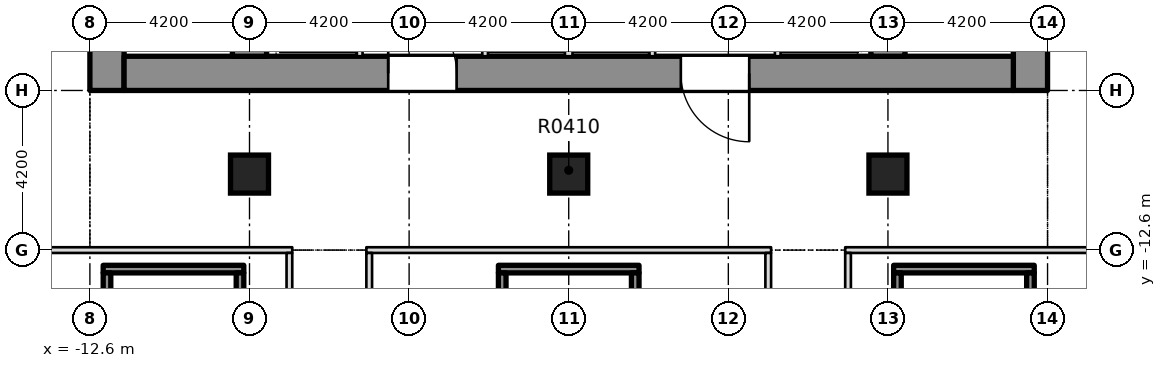
"""IFC4 building model, lengths in metres.
Left out: names, types, materials, properties, quantities, classifications, styles, units other than length and angle.
Written with IfcOpenShell. Run it as: python <this file> out.ifc"""

import sys

from ifc_helpers import new_model, si_unit, direction, frame, frame_2d, origin, origin_2d, place, context, subcontext, project, spatial, rectangle, extrude, element, fill, save


model = new_model("IFC4")
c1 = context("Model", 3, precision=1e-05, world=origin(), true_north=direction((0.0, 1.0)))
c2 = subcontext(c1, "Body", "Model", "MODEL_VIEW")
j1 = project(units=[si_unit("LENGTHUNIT", "METRE"), si_unit("PLANEANGLEUNIT", "RADIAN")], contexts=[c1])
p1 = place(None, origin())
s1 = spatial("IfcSite", under=j1, at=p1, CompositionType="ELEMENT")
p2 = place(p1, origin())
s2 = spatial("IfcBuilding", under=s1, at=p2, CompositionType="ELEMENT")
p3 = place(p2, frame((0.0, 0.0, 25.0)))
s3 = spatial("IfcBuildingStorey", under=s2, at=p3, CompositionType="ELEMENT", Elevation=25.0)
p4 = place(p3, frame((12.15, -8.4, -0.4), z_axis=(0.0, 0.0, 1.0), x_axis=(0.0, 1.0, 0.0)))
e1 = element("IfcWall", 1, at=p4, inside=s3, PredefinedType="SHEAR", context=c2, shape_type="SweptSolid", body=[
    extrude(rectangle(XDim=30.15, YDim=0.9, at=frame_2d((15.075, 0.0))), origin(), (0.0, 0.0, 1.0), 5.0),
])
p5 = place(p4, frame((2.875, 0.0, 0.4)))
e2 = element("IfcOpeningElement", 2, at=p5, cuts=e1, PredefinedType="OPENING", context=c2, shape_type="SweptSolid", body=[
    extrude(rectangle(XDim=0.95, YDim=2.1, at=frame_2d((0.475, 1.05))), frame((0.0, 0.46, 0.0), z_axis=(0.0, -1.0, 0.0), x_axis=(1.0, 0.0, 0.0)), (0.0, 0.0, 1.0), 0.92),
])
p6 = place(p4, frame((6.575, 0.0, 0.4)))
e3 = element("IfcOpeningElement", 3, at=p6, cuts=e1, PredefinedType="OPENING", context=c2, shape_type="SweptSolid", body=[
    extrude(rectangle(XDim=0.95, YDim=2.1, at=frame_2d((0.475, 1.05))), frame((0.0, 0.46, 0.0), z_axis=(0.0, -1.0, 0.0), x_axis=(1.0, 0.0, 0.0)), (0.0, 0.0, 1.0), 0.92),
])
p7 = place(p4, frame((9.425, 0.0, 0.4)))
e4 = element("IfcOpeningElement", 4, at=p7, cuts=e1, PredefinedType="OPENING", context=c2, shape_type="SweptSolid", body=[
    extrude(rectangle(XDim=0.95, YDim=2.1, at=frame_2d((0.475, 1.05))), frame((0.0, 0.46, 0.0), z_axis=(0.0, -1.0, 0.0), x_axis=(1.0, 0.0, 0.0)), (0.0, 0.0, 1.0), 0.92),
])
p8 = place(p4, frame((13.225, 0.0, 0.4)))
e5 = element("IfcOpeningElement", 5, at=p8, cuts=e1, PredefinedType="OPENING", context=c2, shape_type="SweptSolid", body=[
    extrude(rectangle(XDim=0.95, YDim=2.1, at=frame_2d((0.475, 1.05))), frame((0.0, 0.46, 0.0), z_axis=(0.0, -1.0, 0.0), x_axis=(1.0, 0.0, 0.0)), (0.0, 0.0, 1.0), 0.92),
])
p9 = place(p4, frame((16.775, 0.0, 0.4)))
e6 = element("IfcOpeningElement", 6, at=p9, cuts=e1, PredefinedType="OPENING", context=c2, shape_type="SweptSolid", body=[
    extrude(rectangle(XDim=0.95, YDim=2.1, at=frame_2d((0.475, 1.05))), frame((0.0, 0.46, 0.0), z_axis=(0.0, -1.0, 0.0), x_axis=(1.0, 0.0, 0.0)), (0.0, 0.0, 1.0), 0.92),
])
p10 = place(p4, frame((24.75, 0.0, 0.4)))
e7 = element("IfcOpeningElement", 7, at=p10, cuts=e1, PredefinedType="OPENING", context=c2, shape_type="SweptSolid", body=[
    extrude(rectangle(XDim=0.95, YDim=2.1, at=frame_2d((0.475, 1.05))), frame((0.0, 0.46, 0.0), z_axis=(0.0, -1.0, 0.0), x_axis=(1.0, 0.0, 0.0)), (0.0, 0.0, 1.0), 0.92),
])
p11 = place(p4, frame((19.3, 0.0, 0.4)))
e8 = element("IfcOpeningElement", 8, at=p11, cuts=e1, PredefinedType="OPENING", context=c2, shape_type="SweptSolid", body=[
    extrude(rectangle(XDim=1.2, YDim=2.1, at=frame_2d((0.6, 1.05))), frame((0.0, 0.46, 0.0), z_axis=(0.0, -1.0, 0.0), x_axis=(1.0, 0.0, 0.0)), (0.0, 0.0, 1.0), 0.92),
])
p12 = place(p3, frame((-12.15, -8.4, -0.4), z_axis=(0.0, 0.0, 1.0), x_axis=(0.0, 1.0, 0.0)))
e9 = element("IfcWall", 9, at=p12, inside=s3, PredefinedType="SHEAR", context=c2, shape_type="SweptSolid", body=[
    extrude(rectangle(XDim=30.15, YDim=0.9, at=frame_2d((15.075, 0.0))), origin(), (0.0, 0.0, 1.0), 5.0),
])
p13 = place(p12, frame((3.925, 0.0, 0.4)))
e10 = element("IfcOpeningElement", 10, at=p13, cuts=e9, PredefinedType="OPENING", context=c2, shape_type="SweptSolid", body=[
    extrude(rectangle(XDim=0.95, YDim=2.1, at=frame_2d((0.475, 1.05))), frame((0.0, 0.46, 0.0), z_axis=(0.0, -1.0, 0.0), x_axis=(1.0, 0.0, 0.0)), (0.0, 0.0, 1.0), 0.92),
])
p14 = place(p12, frame((9.175, 0.0, 0.4)))
e11 = element("IfcOpeningElement", 11, at=p14, cuts=e9, PredefinedType="OPENING", context=c2, shape_type="SweptSolid", body=[
    extrude(rectangle(XDim=0.95, YDim=2.1, at=frame_2d((0.475, 1.05))), frame((0.0, 0.46, 0.0), z_axis=(0.0, -1.0, 0.0), x_axis=(1.0, 0.0, 0.0)), (0.0, 0.0, 1.0), 0.92),
])
p15 = place(p12, frame((14.525, 0.0, 0.4)))
e12 = element("IfcOpeningElement", 12, at=p15, cuts=e9, PredefinedType="OPENING", context=c2, shape_type="SweptSolid", body=[
    extrude(rectangle(XDim=0.95, YDim=2.1, at=frame_2d((0.475, 1.05))), frame((0.0, 0.46, 0.0), z_axis=(0.0, -1.0, 0.0), x_axis=(1.0, 0.0, 0.0)), (0.0, 0.0, 1.0), 0.92),
])
p16 = place(p12, frame((22.225, 0.0, 0.4)))
e13 = element("IfcOpeningElement", 13, at=p16, cuts=e9, PredefinedType="OPENING", context=c2, shape_type="SweptSolid", body=[
    extrude(rectangle(XDim=0.95, YDim=2.1, at=frame_2d((0.475, 1.05))), frame((0.0, 0.46, 0.0), z_axis=(0.0, -1.0, 0.0), x_axis=(1.0, 0.0, 0.0)), (0.0, 0.0, 1.0), 0.92),
])
p17 = place(p12, frame((26.25, 0.0, 0.4)))
e14 = element("IfcOpeningElement", 14, at=p17, cuts=e9, PredefinedType="OPENING", context=c2, shape_type="SweptSolid", body=[
    extrude(rectangle(XDim=0.95, YDim=2.1, at=frame_2d((0.475, 1.05))), frame((0.0, 0.46, 0.0), z_axis=(0.0, -1.0, 0.0), x_axis=(1.0, 0.0, 0.0)), (0.0, 0.0, 1.0), 0.92),
])
p18 = place(p12, frame((19.3, 0.0, 0.4)))
e15 = element("IfcOpeningElement", 15, at=p18, cuts=e9, PredefinedType="OPENING", context=c2, shape_type="SweptSolid", body=[
    extrude(rectangle(XDim=1.2, YDim=2.1, at=frame_2d((0.6, 1.05))), frame((0.0, 0.46, 0.0), z_axis=(0.0, -1.0, 0.0), x_axis=(1.0, 0.0, 0.0)), (0.0, 0.0, 1.0), 0.92),
])
p19 = place(p3, frame((-11.7, -7.95, -0.4), z_axis=(0.0, 0.0, 1.0), x_axis=(1.0, 0.0, 0.0)))
e16 = element("IfcWall", 16, at=p19, inside=s3, PredefinedType="SHEAR", context=c2, shape_type="SweptSolid", body=[
    extrude(rectangle(XDim=23.4, YDim=0.9, at=frame_2d((11.7, 0.0))), origin(), (0.0, 0.0, 1.0), 5.0),
])
p20 = place(p19, frame((6.95, 0.0, 0.4)))
e17 = element("IfcOpeningElement", 17, at=p20, cuts=e16, PredefinedType="OPENING", context=c2, shape_type="SweptSolid", body=[
    extrude(rectangle(XDim=1.8, YDim=2.1, at=frame_2d((0.9, 1.05))), frame((0.0, 0.46, 0.0), z_axis=(0.0, -1.0, 0.0), x_axis=(1.0, 0.0, 0.0)), (0.0, 0.0, 1.0), 0.92),
])
p21 = place(p19, frame((14.65, 0.0, 0.4)))
e18 = element("IfcOpeningElement", 18, at=p21, cuts=e16, PredefinedType="OPENING", context=c2, shape_type="SweptSolid", body=[
    extrude(rectangle(XDim=1.8, YDim=2.1, at=frame_2d((0.9, 1.05))), frame((0.0, 0.46, 0.0), z_axis=(0.0, -1.0, 0.0), x_axis=(1.0, 0.0, 0.0)), (0.0, 0.0, 1.0), 0.92),
])
p22 = place(p3, frame((-8.4, -7.5, -0.4), z_axis=(0.0, 0.0, 1.0), x_axis=(0.0, 1.0, 0.0)))
e19 = element("IfcWall", 19, at=p22, inside=s3, PredefinedType="SHEAR", context=c2, shape_type="SweptSolid", body=[
    extrude(rectangle(XDim=28.35, YDim=0.9, at=frame_2d((14.175, 0.0))), origin(), (0.0, 0.0, 1.0), 5.0),
])
p23 = place(p22, frame((18.4, 0.0, 0.4)))
e20 = element("IfcOpeningElement", 20, at=p23, cuts=e19, PredefinedType="OPENING", context=c2, shape_type="SweptSolid", body=[
    extrude(rectangle(XDim=1.2, YDim=2.1, at=frame_2d((0.6, 1.05))), frame((0.0, 0.46, 0.0), z_axis=(0.0, -1.0, 0.0), x_axis=(1.0, 0.0, 0.0)), (0.0, 0.0, 1.0), 0.92),
])
p24 = place(p3, frame((8.4, -7.5, -0.4), z_axis=(0.0, 0.0, 1.0), x_axis=(0.0, 1.0, 0.0)))
e21 = element("IfcWall", 21, at=p24, inside=s3, PredefinedType="SHEAR", context=c2, shape_type="SweptSolid", body=[
    extrude(rectangle(XDim=28.35, YDim=0.9, at=frame_2d((14.175, 0.0))), origin(), (0.0, 0.0, 1.0), 5.0),
])
p25 = place(p24, frame((18.4, 0.0, 0.4)))
e22 = element("IfcOpeningElement", 22, at=p25, cuts=e21, PredefinedType="OPENING", context=c2, shape_type="SweptSolid", body=[
    extrude(rectangle(XDim=1.2, YDim=2.1, at=frame_2d((0.6, 1.05))), frame((0.0, 0.46, 0.0), z_axis=(0.0, -1.0, 0.0), x_axis=(1.0, 0.0, 0.0)), (0.0, 0.0, 1.0), 0.92),
])
for number, where, z_axis, x_axis in (
    (23, (-8.4, -10.6, -0.4), (0.0, 0.0, 1.0), (1.0, 0.0, 0.0)),
    (24, (0.0, -10.6, -0.4), (0.0, 0.0, 1.0), (1.0, 0.0, 0.0)),
    (25, (8.4, -10.6, -0.4), (0.0, 0.0, 1.0), (1.0, 0.0, 0.0)),
):
    element("IfcColumn", number, at=place(p3, frame(where, z_axis=z_axis, x_axis=x_axis)), inside=s3, PredefinedType="COLUMN", context=c2, shape_type="SweptSolid", body=[
        extrude(rectangle(XDim=1.0, YDim=1.0, at=origin_2d()), origin(), (0.0, 0.0, 1.0), 5.0),
    ])
p26 = place(p3, frame((-16.9, -12.6, 0.0), z_axis=(0.0, 0.0, 1.0), x_axis=(1.0, 0.0, 0.0)))
e26 = element("IfcWall", 26, at=p26, inside=s3, PredefinedType="PARTITIONING", context=c2, shape_type="SweptSolid", body=[
    extrude(rectangle(XDim=9.625, YDim=0.15, at=frame_2d((4.812, 0.0))), origin(), (0.0, 0.0, 1.0), 4.6),
])
p27 = place(p3, frame((-5.325, -12.6, 0.0), z_axis=(0.0, 0.0, 1.0), x_axis=(1.0, 0.0, 0.0)))
e27 = element("IfcWall", 27, at=p27, inside=s3, PredefinedType="PARTITIONING", context=c2, shape_type="SweptSolid", body=[
    extrude(rectangle(XDim=10.65, YDim=0.15, at=frame_2d((5.325, 0.0))), origin(), (0.0, 0.0, 1.0), 4.6),
])
p28 = place(p3, frame((7.275, -12.6, 0.0), z_axis=(0.0, 0.0, 1.0), x_axis=(1.0, 0.0, 0.0)))
e28 = element("IfcWall", 28, at=p28, inside=s3, PredefinedType="PARTITIONING", context=c2, shape_type="SweptSolid", body=[
    extrude(rectangle(XDim=9.625, YDim=0.15, at=frame_2d((4.812, 0.0))), origin(), (0.0, 0.0, 1.0), 4.6),
])
for number, where, z_axis, x_axis in (
    (29, (-7.35, -18.125, 0.0), (0.0, 0.0, 1.0), (0.0, 1.0, 0.0)),
    (30, (-5.25, -18.125, 0.0), (0.0, 0.0, 1.0), (0.0, 1.0, 0.0)),
    (31, (5.25, -18.125, 0.0), (0.0, 0.0, 1.0), (0.0, 1.0, 0.0)),
    (32, (7.35, -18.125, 0.0), (0.0, 0.0, 1.0), (0.0, 1.0, 0.0)),
):
    element("IfcWall", number, at=place(p3, frame(where, z_axis=z_axis, x_axis=x_axis)), inside=s3, PredefinedType="PARTITIONING", context=c2, shape_type="SweptSolid", body=[
        extrude(rectangle(XDim=5.45, YDim=0.15, at=frame_2d((2.725, 0.0))), origin(), (0.0, 0.0, 1.0), 4.6),
    ])
p29 = place(p3, frame((-5.5, -7.499, 0.0), z_axis=(0.0, 0.0, 1.0), x_axis=(0.0, 1.0, 0.0)))
e33 = element("IfcWall", 33, at=p29, inside=s3, PredefinedType="PARTITIONING", context=c2, shape_type="SweptSolid", body=[
    extrude(rectangle(XDim=11.924, YDim=0.15, at=frame_2d((5.962, 0.0))), origin(), (0.0, 0.0, 1.0), 4.6),
])
p30 = place(p29, frame((0.949, 0.0, 0.0)))
e34 = element("IfcOpeningElement", 34, at=p30, cuts=e33, PredefinedType="OPENING", context=c2, shape_type="SweptSolid", body=[
    extrude(rectangle(XDim=1.1, YDim=2.1, at=frame_2d((0.55, 1.05))), frame((0.0, 0.085, 0.0), z_axis=(0.0, -1.0, 0.0), x_axis=(1.0, 0.0, 0.0)), (0.0, 0.0, 1.0), 0.17),
])
p31 = place(p29, frame((3.949, 0.0, 0.0)))
e35 = element("IfcOpeningElement", 35, at=p31, cuts=e33, PredefinedType="OPENING", context=c2, shape_type="SweptSolid", body=[
    extrude(rectangle(XDim=1.1, YDim=2.1, at=frame_2d((0.55, 1.05))), frame((0.0, 0.085, 0.0), z_axis=(0.0, -1.0, 0.0), x_axis=(1.0, 0.0, 0.0)), (0.0, 0.0, 1.0), 0.17),
])
p32 = place(p29, frame((6.949, 0.0, 0.0)))
e36 = element("IfcOpeningElement", 36, at=p32, cuts=e33, PredefinedType="OPENING", context=c2, shape_type="SweptSolid", body=[
    extrude(rectangle(XDim=1.1, YDim=2.1, at=frame_2d((0.55, 1.05))), frame((0.0, 0.085, 0.0), z_axis=(0.0, -1.0, 0.0), x_axis=(1.0, 0.0, 0.0)), (0.0, 0.0, 1.0), 0.17),
])
p33 = place(p29, frame((9.949, 0.0, 0.0)))
e37 = element("IfcOpeningElement", 37, at=p33, cuts=e33, PredefinedType="OPENING", context=c2, shape_type="SweptSolid", body=[
    extrude(rectangle(XDim=1.1, YDim=2.1, at=frame_2d((0.55, 1.05))), frame((0.0, 0.085, 0.0), z_axis=(0.0, -1.0, 0.0), x_axis=(1.0, 0.0, 0.0)), (0.0, 0.0, 1.0), 0.17),
])
p34 = place(p3, frame((-2.2, -7.499, 0.0), z_axis=(0.0, 0.0, 1.0), x_axis=(0.0, 1.0, 0.0)))
e38 = element("IfcWall", 38, at=p34, inside=s3, PredefinedType="PARTITIONING", context=c2, shape_type="SweptSolid", body=[
    extrude(rectangle(XDim=11.924, YDim=0.15, at=frame_2d((5.962, 0.0))), origin(), (0.0, 0.0, 1.0), 4.6),
])
p35 = place(p34, frame((0.949, 0.0, 0.0)))
e39 = element("IfcOpeningElement", 39, at=p35, cuts=e38, PredefinedType="OPENING", context=c2, shape_type="SweptSolid", body=[
    extrude(rectangle(XDim=1.1, YDim=2.1, at=frame_2d((0.55, 1.05))), frame((0.0, 0.085, 0.0), z_axis=(0.0, -1.0, 0.0), x_axis=(1.0, 0.0, 0.0)), (0.0, 0.0, 1.0), 0.17),
])
p36 = place(p34, frame((3.949, 0.0, 0.0)))
e40 = element("IfcOpeningElement", 40, at=p36, cuts=e38, PredefinedType="OPENING", context=c2, shape_type="SweptSolid", body=[
    extrude(rectangle(XDim=1.1, YDim=2.1, at=frame_2d((0.55, 1.05))), frame((0.0, 0.085, 0.0), z_axis=(0.0, -1.0, 0.0), x_axis=(1.0, 0.0, 0.0)), (0.0, 0.0, 1.0), 0.17),
])
p37 = place(p34, frame((6.949, 0.0, 0.0)))
e41 = element("IfcOpeningElement", 41, at=p37, cuts=e38, PredefinedType="OPENING", context=c2, shape_type="SweptSolid", body=[
    extrude(rectangle(XDim=1.1, YDim=2.1, at=frame_2d((0.55, 1.05))), frame((0.0, 0.085, 0.0), z_axis=(0.0, -1.0, 0.0), x_axis=(1.0, 0.0, 0.0)), (0.0, 0.0, 1.0), 0.17),
])
p38 = place(p34, frame((9.949, 0.0, 0.0)))
e42 = element("IfcOpeningElement", 42, at=p38, cuts=e38, PredefinedType="OPENING", context=c2, shape_type="SweptSolid", body=[
    extrude(rectangle(XDim=1.1, YDim=2.1, at=frame_2d((0.55, 1.05))), frame((0.0, 0.085, 0.0), z_axis=(0.0, -1.0, 0.0), x_axis=(1.0, 0.0, 0.0)), (0.0, 0.0, 1.0), 0.17),
])
p39 = place(p3, frame((0.0, -7.499, 0.0), z_axis=(0.0, 0.0, 1.0), x_axis=(0.0, 1.0, 0.0)))
e43 = element("IfcWall", 43, at=p39, inside=s3, PredefinedType="PARTITIONING", context=c2, shape_type="SweptSolid", body=[
    extrude(rectangle(XDim=11.924, YDim=0.2, at=frame_2d((5.962, 0.0))), origin(), (0.0, 0.0, 1.0), 4.6),
])
p40 = place(p3, frame((2.2, -7.499, 0.0), z_axis=(0.0, 0.0, 1.0), x_axis=(0.0, 1.0, 0.0)))
e44 = element("IfcWall", 44, at=p40, inside=s3, PredefinedType="PARTITIONING", context=c2, shape_type="SweptSolid", body=[
    extrude(rectangle(XDim=11.924, YDim=0.15, at=frame_2d((5.962, 0.0))), origin(), (0.0, 0.0, 1.0), 4.6),
])
p41 = place(p3, frame((5.5, -7.499, 0.0), z_axis=(0.0, 0.0, 1.0), x_axis=(0.0, 1.0, 0.0)))
e45 = element("IfcWall", 45, at=p41, inside=s3, PredefinedType="PARTITIONING", context=c2, shape_type="SweptSolid", body=[
    extrude(rectangle(XDim=11.924, YDim=0.15, at=frame_2d((5.962, 0.0))), origin(), (0.0, 0.0, 1.0), 4.6),
])
p42 = place(p41, frame((6.949, 0.0, 0.0)))
e46 = element("IfcOpeningElement", 46, at=p42, cuts=e45, PredefinedType="OPENING", context=c2, shape_type="SweptSolid", body=[
    extrude(rectangle(XDim=1.1, YDim=2.1, at=frame_2d((0.55, 1.05))), frame((0.0, 0.085, 0.0), z_axis=(0.0, -1.0, 0.0), x_axis=(1.0, 0.0, 0.0)), (0.0, 0.0, 1.0), 0.17),
])
p43 = place(p41, frame((9.949, 0.0, 0.0)))
e47 = element("IfcOpeningElement", 47, at=p43, cuts=e45, PredefinedType="OPENING", context=c2, shape_type="SweptSolid", body=[
    extrude(rectangle(XDim=1.1, YDim=2.1, at=frame_2d((0.55, 1.05))), frame((0.0, 0.085, 0.0), z_axis=(0.0, -1.0, 0.0), x_axis=(1.0, 0.0, 0.0)), (0.0, 0.0, 1.0), 0.17),
])
p44 = place(p3, frame((-12.25, -13.1, 0.0), z_axis=(0.0, 0.0, 1.0), x_axis=(1.0, 0.0, 0.0)))
e48 = element("IfcWall", 48, at=p44, inside=s3, PredefinedType="SOLIDWALL", context=c2, shape_type="SweptSolid", body=[
    extrude(rectangle(XDim=3.7, YDim=0.2, at=frame_2d((1.85, 0.0))), origin(), (0.0, 0.0, 1.0), 4.6),
])
p45 = place(p3, frame((-12.15, -19.8, 0.0), z_axis=(0.0, 0.0, 1.0), x_axis=(0.0, 1.0, 0.0)))
e49 = element("IfcWall", 49, at=p45, inside=s3, PredefinedType="SOLIDWALL", context=c2, shape_type="SweptSolid", body=[
    extrude(rectangle(XDim=6.6, YDim=0.2, at=frame_2d((3.3, 0.0))), origin(), (0.0, 0.0, 1.0), 4.6),
])
p46 = place(p3, frame((-8.65, -20.3, 0.0), z_axis=(0.0, 0.0, 1.0), x_axis=(0.0, 1.0, 0.0)))
e50 = element("IfcWall", 50, at=p46, inside=s3, PredefinedType="SOLIDWALL", context=c2, shape_type="SweptSolid", body=[
    extrude(rectangle(XDim=7.1, YDim=0.2, at=frame_2d((3.55, 0.0))), origin(), (0.0, 0.0, 1.0), 4.6),
])
p47 = place(p3, frame((-1.85, -13.1, 0.0), z_axis=(0.0, 0.0, 1.0), x_axis=(1.0, 0.0, 0.0)))
e51 = element("IfcWall", 51, at=p47, inside=s3, PredefinedType="SOLIDWALL", context=c2, shape_type="SweptSolid", body=[
    extrude(rectangle(XDim=3.7, YDim=0.2, at=frame_2d((1.85, 0.0))), origin(), (0.0, 0.0, 1.0), 4.6),
])
for number, where, z_axis, x_axis in (
    (52, (-1.75, -19.8, 0.0), (0.0, 0.0, 1.0), (0.0, 1.0, 0.0)),
    (53, (1.75, -19.8, 0.0), (0.0, 0.0, 1.0), (0.0, 1.0, 0.0)),
):
    element("IfcWall", number, at=place(p3, frame(where, z_axis=z_axis, x_axis=x_axis)), inside=s3, PredefinedType="SOLIDWALL", context=c2, shape_type="SweptSolid", body=[
        extrude(rectangle(XDim=6.6, YDim=0.2, at=frame_2d((3.3, 0.0))), origin(), (0.0, 0.0, 1.0), 4.6),
    ])
p48 = place(p3, frame((8.55, -13.1, 0.0), z_axis=(0.0, 0.0, 1.0), x_axis=(1.0, 0.0, 0.0)))
e54 = element("IfcWall", 54, at=p48, inside=s3, PredefinedType="SOLIDWALL", context=c2, shape_type="SweptSolid", body=[
    extrude(rectangle(XDim=3.7, YDim=0.2, at=frame_2d((1.85, 0.0))), origin(), (0.0, 0.0, 1.0), 4.6),
])
p49 = place(p3, frame((8.65, -20.3, 0.0), z_axis=(0.0, 0.0, 1.0), x_axis=(0.0, 1.0, 0.0)))
e55 = element("IfcWall", 55, at=p49, inside=s3, PredefinedType="SOLIDWALL", context=c2, shape_type="SweptSolid", body=[
    extrude(rectangle(XDim=7.1, YDim=0.2, at=frame_2d((3.55, 0.0))), origin(), (0.0, 0.0, 1.0), 4.6),
])
p50 = place(p3, frame((12.15, -19.8, 0.0), z_axis=(0.0, 0.0, 1.0), x_axis=(0.0, 1.0, 0.0)))
e56 = element("IfcWall", 56, at=p50, inside=s3, PredefinedType="SOLIDWALL", context=c2, shape_type="SweptSolid", body=[
    extrude(rectangle(XDim=6.6, YDim=0.2, at=frame_2d((3.3, 0.0))), origin(), (0.0, 0.0, 1.0), 4.6),
])
p51 = place(p20, origin())
e57 = element("IfcDoor", 57, at=p51, inside=s3, OperationType="SINGLE_SWING_LEFT", PredefinedType="DOOR", context=c2, shape_type="SweptSolid", body=[
    extrude(rectangle(XDim=1.8, YDim=2.1, at=frame_2d((0.9, 1.05))), frame((0.0, 0.025, 0.0), z_axis=(0.0, -1.0, 0.0), x_axis=(1.0, 0.0, 0.0)), (0.0, 0.0, 1.0), 0.05),
])
fill(e17, e57)
p52 = place(p21, origin())
e58 = element("IfcDoor", 58, at=p52, inside=s3, OperationType="SINGLE_SWING_LEFT", PredefinedType="DOOR", context=c2, shape_type="SweptSolid", body=[
    extrude(rectangle(XDim=1.8, YDim=2.1, at=frame_2d((0.9, 1.05))), frame((0.0, 0.025, 0.0), z_axis=(0.0, -1.0, 0.0), x_axis=(1.0, 0.0, 0.0)), (0.0, 0.0, 1.0), 0.05),
])
fill(e18, e58)
save(model, sys.argv[1])
